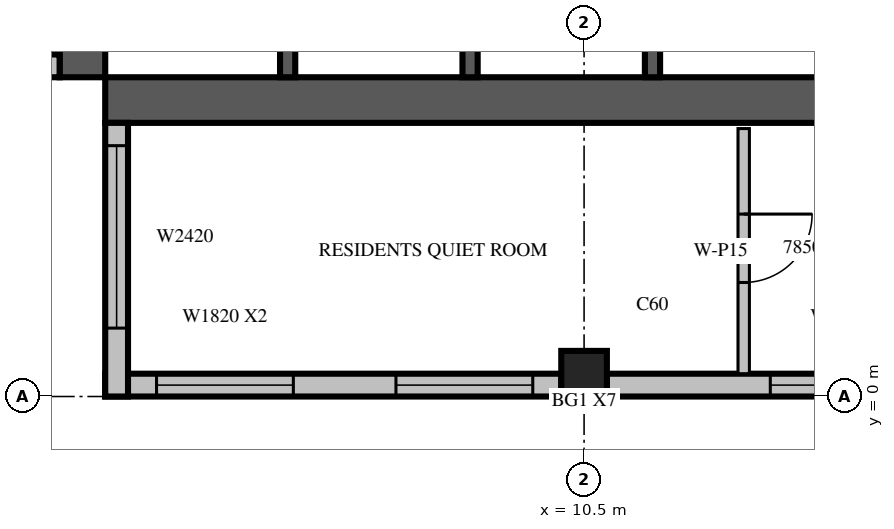
"""IFC4 building model, lengths in metres.
Left out: names, types, materials, properties, quantities, classifications, styles, units other than length and angle.
Written with IfcOpenShell. Run it as: python <this file> out.ifc"""

import sys

from ifc_helpers import new_model, si_unit, direction, frame, frame_2d, origin, origin_2d, place, context, subcontext, project, spatial, rectangle, extrude, source, transform, mapped, element, fill, save


model = new_model("IFC4")
c1 = context("Model", 3, precision=1e-05, world=origin(), true_north=direction((0.0, 1.0)))
c2 = subcontext(c1, "Body", "Model", "MODEL_VIEW")
j1 = project(units=[si_unit("LENGTHUNIT", "METRE"), si_unit("PLANEANGLEUNIT", "RADIAN")], contexts=[c1])
p1 = place(None, origin())
s1 = spatial("IfcSite", under=j1, at=p1, CompositionType="ELEMENT")
p2 = place(p1, origin())
s2 = spatial("IfcBuilding", under=s1, at=p2, CompositionType="ELEMENT")
p3 = place(p2, frame((0.0, 0.0, 358.0)))
s3 = spatial("IfcBuildingStorey", under=s2, at=p3, CompositionType="ELEMENT", Elevation=358.0)
m1 = source(origin(), c2, "Body", "SweptSolid", [
    extrude(rectangle(XDim=0.6, YDim=0.6, at=origin_2d()), origin(), (0.0, 0.0, 1.0), 3.5),
])
p4 = place(p3, frame((10.5, 0.3, 0.0), z_axis=(0.0, 0.0, 1.0), x_axis=(1.0, 0.0, 0.0)))
e1 = element("IfcColumn", 1, at=p4, inside=s3, PredefinedType="COLUMN", context=c2, shape_type="MappedRepresentation", body=[
    mapped(m1, transform((0.0, 0.0, 0.0), scale=1.0)),
])
m2 = source(origin(), c2, "Body", "SweptSolid", [
    extrude(rectangle(XDim=17.4, YDim=0.6, at=frame_2d((8.7, 0.0))), origin(), (0.0, 0.0, 1.0), 3.5),
])
p5 = place(p3, frame((3.9, 4.2, 0.0), z_axis=(0.0, 0.0, 1.0), x_axis=(0.0, 1.0, 0.0)))
e2 = element("IfcWall", 2, at=p5, inside=s3, PredefinedType="SHEAR", context=c2, shape_type="MappedRepresentation", body=[
    mapped(m2, transform((0.0, 0.0, 0.0), scale=1.0)),
])
m3 = source(origin(), c2, "Body", "SweptSolid", [
    extrude(rectangle(XDim=2.2, YDim=2.1, at=frame_2d((1.1, 1.05))), frame((0.0, 0.31, 0.0), z_axis=(0.0, -1.0, 0.0), x_axis=(1.0, 0.0, 0.0)), (0.0, 0.0, 1.0), 0.62),
])
p6 = place(p5, frame((4.2, 0.0, 0.0)))
e3 = element("IfcOpeningElement", 3, at=p6, cuts=e2, PredefinedType="OPENING", context=c2, shape_type="MappedRepresentation", body=[
    mapped(m3, transform((0.0, 0.0, 0.0), scale=1.0)),
])
p7 = place(p3, frame((4.2, 3.9, 0.0), z_axis=(0.0, 0.0, 1.0), x_axis=(1.0, 0.0, 0.0)))
e4 = element("IfcWall", 4, at=p7, inside=s3, PredefinedType="SHEAR", context=c2, shape_type="MappedRepresentation", body=[
    mapped(m2, transform((0.0, 0.0, 0.0), scale=1.0)),
])
m4 = source(origin(), c2, "Body", "SweptSolid", [
    extrude(rectangle(XDim=0.9, YDim=2.1, at=frame_2d((0.45, 1.05))), frame((0.0, 0.31, 0.0), z_axis=(0.0, -1.0, 0.0), x_axis=(1.0, 0.0, 0.0)), (0.0, 0.0, 1.0), 0.62),
])
p8 = place(p7, frame((14.0, 0.0, 0.0)))
e5 = element("IfcOpeningElement", 5, at=p8, cuts=e4, PredefinedType="OPENING", context=c2, shape_type="MappedRepresentation", body=[
    mapped(m4, transform((0.0, 0.0, 0.0), scale=1.0)),
])
m5 = source(origin(), c2, "Body", "SweptSolid", [
    extrude(rectangle(XDim=6.0, YDim=0.3, at=frame_2d((3.0, 0.0))), origin(), (0.0, 0.0, 1.0), 3.1),
])
p9 = place(p3, frame((4.2, 0.15, 0.0), z_axis=(0.0, 0.0, 1.0), x_axis=(1.0, 0.0, 0.0)))
e6 = element("IfcWall", 6, at=p9, inside=s3, PredefinedType="STANDARD", context=c2, shape_type="MappedRepresentation", body=[
    mapped(m5, transform((0.0, 0.0, 0.0), scale=1.0)),
])
m6 = source(origin(), c2, "Body", "SweptSolid", [
    extrude(rectangle(XDim=1.8, YDim=2.0, at=frame_2d((0.9, 1.0))), frame((0.0, 0.16, 0.0), z_axis=(0.0, -1.0, 0.0), x_axis=(1.0, 0.0, 0.0)), (0.0, 0.0, 1.0), 0.32),
])
p10 = place(p9, frame((0.675, 0.0, 0.6)))
e7 = element("IfcOpeningElement", 7, at=p10, cuts=e6, PredefinedType="OPENING", context=c2, shape_type="MappedRepresentation", body=[
    mapped(m6, transform((0.0, 0.0, 0.0), scale=1.0)),
])
p11 = place(p9, frame((3.825, 0.0, 0.6)))
e8 = element("IfcOpeningElement", 8, at=p11, cuts=e6, PredefinedType="OPENING", context=c2, shape_type="MappedRepresentation", body=[
    mapped(m6, transform((0.0, 0.0, 0.0), scale=1.0)),
])
m7 = source(origin(), c2, "Body", "SweptSolid", [
    extrude(rectangle(XDim=9.9, YDim=0.3, at=frame_2d((4.95, 0.0))), origin(), (0.0, 0.0, 1.0), 3.1),
])
p12 = place(p3, frame((10.8, 0.15, 0.0), z_axis=(0.0, 0.0, 1.0), x_axis=(1.0, 0.0, 0.0)))
e9 = element("IfcWall", 9, at=p12, inside=s3, PredefinedType="STANDARD", context=c2, shape_type="MappedRepresentation", body=[
    mapped(m7, transform((0.0, 0.0, 0.0), scale=1.0)),
])
p13 = place(p12, frame((2.15, 0.0, 0.6)))
e10 = element("IfcOpeningElement", 10, at=p13, cuts=e9, PredefinedType="OPENING", context=c2, shape_type="MappedRepresentation", body=[
    mapped(m6, transform((0.0, 0.0, 0.0), scale=1.0)),
])
m8 = source(origin(), c2, "Body", "SweptSolid", [
    extrude(rectangle(XDim=3.6, YDim=2.0, at=frame_2d((1.8, 1.0))), frame((0.0, 0.16, 0.0), z_axis=(0.0, -1.0, 0.0), x_axis=(1.0, 0.0, 0.0)), (0.0, 0.0, 1.0), 0.32),
])
p14 = place(p12, frame((5.775, 0.0, 0.6)))
e11 = element("IfcOpeningElement", 11, at=p14, cuts=e9, PredefinedType="OPENING", context=c2, shape_type="MappedRepresentation", body=[
    mapped(m8, transform((0.0, 0.0, 0.0), scale=1.0)),
])
m9 = source(origin(), c2, "Body", "SweptSolid", [
    extrude(rectangle(XDim=3.6, YDim=0.3, at=frame_2d((1.8, 0.0))), origin(), (0.0, 0.0, 1.0), 3.1),
])
p15 = place(p3, frame((0.0, 4.35, 0.0), z_axis=(0.0, 0.0, 1.0), x_axis=(1.0, 0.0, 0.0)))
e12 = element("IfcWall", 12, at=p15, inside=s3, PredefinedType="STANDARD", context=c2, shape_type="MappedRepresentation", body=[
    mapped(m9, transform((0.0, 0.0, 0.0), scale=1.0)),
])
m10 = source(origin(), c2, "Body", "SweptSolid", [
    extrude(rectangle(XDim=2.4, YDim=2.0, at=frame_2d((1.2, 1.0))), frame((0.0, 0.16, 0.0), z_axis=(0.0, -1.0, 0.0), x_axis=(1.0, 0.0, 0.0)), (0.0, 0.0, 1.0), 0.32),
])
p16 = place(p15, frame((0.9, 0.0, 0.6)))
e13 = element("IfcOpeningElement", 13, at=p16, cuts=e12, PredefinedType="OPENING", context=c2, shape_type="MappedRepresentation", body=[
    mapped(m10, transform((0.0, 0.0, 0.0), scale=1.0)),
])
p17 = place(p3, frame((4.35, 3.6, 0.0), z_axis=(0.0, 0.0, 1.0), x_axis=(0.0, -1.0, 0.0)))
e14 = element("IfcWall", 14, at=p17, inside=s3, PredefinedType="STANDARD", context=c2, shape_type="MappedRepresentation", body=[
    mapped(m9, transform((0.0, 0.0, 0.0), scale=1.0)),
])
p18 = place(p17, frame((0.3, 0.0, 0.6)))
e15 = element("IfcOpeningElement", 15, at=p18, cuts=e14, PredefinedType="OPENING", context=c2, shape_type="MappedRepresentation", body=[
    mapped(m10, transform((0.0, 0.0, 0.0), scale=1.0)),
])
m11 = source(origin(), c2, "Body", "SweptSolid", [
    extrude(rectangle(XDim=3.1, YDim=0.2, at=frame_2d((1.55, 0.0))), origin(), (0.0, 0.0, 1.0), 3.5),
])
for number, where, z_axis, x_axis in (
    (16, (6.6, 4.2, 0.0), (0.0, 0.0, 1.0), (0.0, 1.0, 0.0)),
    (17, (9.0, 4.2, 0.0), (0.0, 0.0, 1.0), (0.0, 1.0, 0.0)),
    (18, (11.4, 4.2, 0.0), (0.0, 0.0, 1.0), (0.0, 1.0, 0.0)),
):
    element("IfcWall", number, at=place(p3, frame(where, z_axis=z_axis, x_axis=x_axis)), inside=s3, PredefinedType="SOLIDWALL", context=c2, shape_type="MappedRepresentation", body=[
        mapped(m11, transform((0.0, 0.0, 0.0), scale=1.0)),
    ])
m12 = source(origin(), c2, "Body", "SweptSolid", [
    extrude(rectangle(XDim=3.225, YDim=0.15, at=frame_2d((1.613, 0.0))), origin(), (0.0, 0.0, 1.0), 3.1),
])
p19 = place(p3, frame((12.6, 3.525, 0.0), z_axis=(0.0, 0.0, 1.0), x_axis=(0.0, -1.0, 0.0)))
e19 = element("IfcWall", 19, at=p19, inside=s3, PredefinedType="PARTITIONING", context=c2, shape_type="MappedRepresentation", body=[
    mapped(m12, transform((0.0, 0.0, 0.0), scale=1.0)),
])
m13 = source(origin(), c2, "Body", "SweptSolid", [
    extrude(rectangle(XDim=0.9, YDim=2.1, at=frame_2d((0.45, 1.05))), frame((0.0, 0.085, 0.0), z_axis=(0.0, -1.0, 0.0), x_axis=(1.0, 0.0, 0.0)), (0.0, 0.0, 1.0), 0.17),
])
p20 = place(p19, frame((1.125, 0.0, 0.0)))
e20 = element("IfcOpeningElement", 20, at=p20, cuts=e19, PredefinedType="OPENING", context=c2, shape_type="MappedRepresentation", body=[
    mapped(m13, transform((0.0, 0.0, 0.0), scale=1.0)),
])
m14 = source(origin(), c2, "Body", "SweptSolid", [
    extrude(rectangle(XDim=1.8, YDim=2.0, at=frame_2d((0.9, 1.0))), frame((0.0, 0.03, 0.0), z_axis=(0.0, -1.0, 0.0), x_axis=(1.0, 0.0, 0.0)), (0.0, 0.0, 1.0), 0.06),
])
p21 = place(p10, origin())
e21 = element("IfcWindow", 21, at=p21, inside=s3, PartitioningType="SINGLE_PANEL", PredefinedType="WINDOW", context=c2, shape_type="MappedRepresentation", body=[
    mapped(m14, transform((0.0, 0.0, 0.0), scale=1.0)),
])
fill(e7, e21)
p22 = place(p11, origin())
e22 = element("IfcWindow", 22, at=p22, inside=s3, PartitioningType="SINGLE_PANEL", PredefinedType="WINDOW", context=c2, shape_type="MappedRepresentation", body=[
    mapped(m14, transform((0.0, 0.0, 0.0), scale=1.0)),
])
fill(e8, e22)
p23 = place(p13, origin())
e23 = element("IfcWindow", 23, at=p23, inside=s3, PartitioningType="SINGLE_PANEL", PredefinedType="WINDOW", context=c2, shape_type="MappedRepresentation", body=[
    mapped(m14, transform((0.0, 0.0, 0.0), scale=1.0)),
])
fill(e10, e23)
m15 = source(origin(), c2, "Body", "SweptSolid", [
    extrude(rectangle(XDim=2.4, YDim=2.0, at=frame_2d((1.2, 1.0))), frame((0.0, 0.03, 0.0), z_axis=(0.0, -1.0, 0.0), x_axis=(1.0, 0.0, 0.0)), (0.0, 0.0, 1.0), 0.06),
])
p24 = place(p18, origin())
e24 = element("IfcWindow", 24, at=p24, inside=s3, PartitioningType="SINGLE_PANEL", PredefinedType="WINDOW", context=c2, shape_type="MappedRepresentation", body=[
    mapped(m15, transform((0.0, 0.0, 0.0), scale=1.0)),
])
fill(e15, e24)
m16 = source(origin(), c2, "Body", "SweptSolid", [
    extrude(rectangle(XDim=0.9, YDim=2.1, at=frame_2d((0.45, 1.05))), frame((0.0, 0.025, 0.0), z_axis=(0.0, -1.0, 0.0), x_axis=(1.0, 0.0, 0.0)), (0.0, 0.0, 1.0), 0.05),
])
p25 = place(p20, origin())
e25 = element("IfcDoor", 25, at=p25, inside=s3, OperationType="SINGLE_SWING_LEFT", PredefinedType="DOOR", context=c2, shape_type="MappedRepresentation", body=[
    mapped(m16, transform((0.0, 0.0, 0.0), scale=1.0)),
])
fill(e20, e25)
save(model, sys.argv[1])
